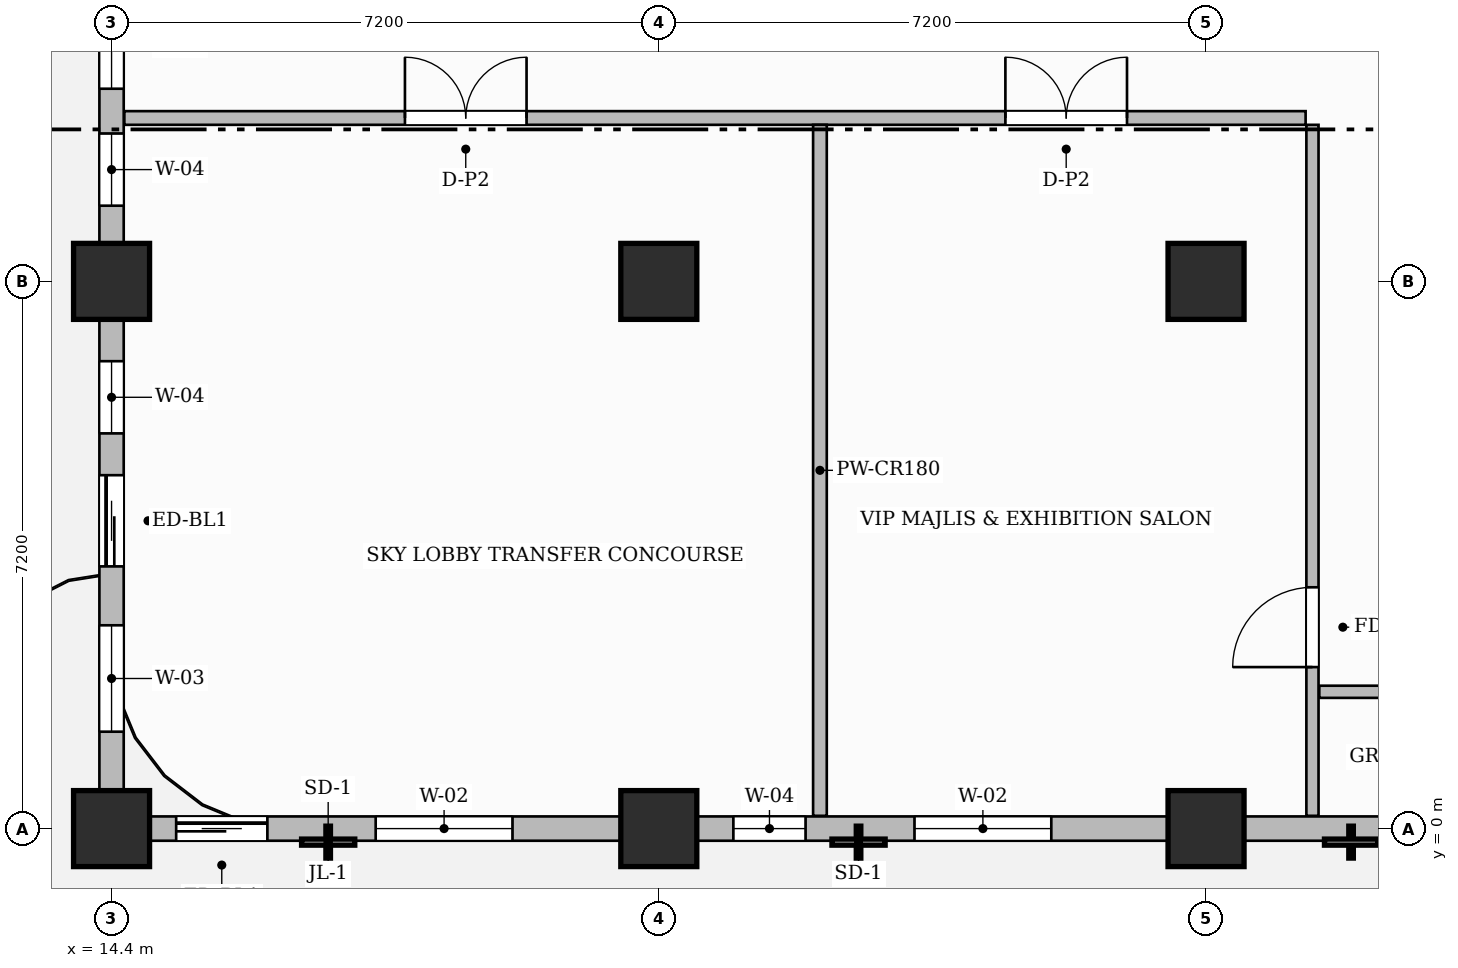
"""IFC4 building model, lengths in metres.
Left out: names, types, materials, properties, quantities, classifications, styles, units other than length and angle.
Written with IfcOpenShell. Run it as: python <this file> out.ifc"""

import sys

from ifc_helpers import new_model, si_unit, direction, frame, frame_2d, origin, origin_2d, place, context, subcontext, project, spatial, rectangle, extrude, source, transform, mapped, element, fill, save


model = new_model("IFC4")
c1 = context("Model", 3, precision=1e-05, world=origin(), true_north=direction((0.0, 1.0)))
c2 = subcontext(c1, "Body", "Model", "MODEL_VIEW")
j1 = project(units=[si_unit("LENGTHUNIT", "METRE"), si_unit("PLANEANGLEUNIT", "RADIAN")], contexts=[c1])
p1 = place(None, origin())
s1 = spatial("IfcSite", under=j1, at=p1, CompositionType="ELEMENT")
p2 = place(p1, origin())
s2 = spatial("IfcBuilding", under=s1, at=p2, CompositionType="ELEMENT")
p3 = place(p2, frame((0.0, 0.0, 145.1)))
s3 = spatial("IfcBuildingStorey", under=s2, at=p3, CompositionType="ELEMENT", Elevation=145.1)
m1 = source(origin(), c2, "Body", "SweptSolid", [
    extrude(rectangle(XDim=1.0, YDim=1.0, at=origin_2d()), origin(), (0.0, 0.0, 1.0), 5.2),
])
for number, where, z_axis, x_axis in (
    (1, (14.4, 0.0, 0.0), (0.0, 0.0, 1.0), (1.0, 0.0, 0.0)),
    (2, (14.4, 7.2, 0.0), (0.0, 0.0, 1.0), (1.0, 0.0, 0.0)),
    (3, (21.6, 0.0, 0.0), (0.0, 0.0, 1.0), (1.0, 0.0, 0.0)),
    (4, (21.6, 7.2, 0.0), (0.0, 0.0, 1.0), (1.0, 0.0, 0.0)),
    (5, (28.8, 0.0, 0.0), (0.0, 0.0, 1.0), (1.0, 0.0, 0.0)),
    (6, (28.8, 7.2, 0.0), (0.0, 0.0, 1.0), (1.0, 0.0, 0.0)),
):
    element("IfcColumn", number, at=place(p3, frame(where, z_axis=z_axis, x_axis=x_axis)), inside=s3, PredefinedType="COLUMN", context=c2, shape_type="MappedRepresentation", body=[
        mapped(m1, transform((0.0, 0.0, 0.0), scale=1.0)),
    ])
p4 = place(p3, frame((14.568, 9.35, 0.0), z_axis=(0.0, 0.0, 1.0), x_axis=(1.0, 0.0, 0.0)))
e7 = element("IfcWall", 7, at=p4, inside=s3, PredefinedType="PARTITIONING", context=c2, shape_type="SweptSolid", body=[
    extrude(rectangle(XDim=15.542, YDim=0.18, at=frame_2d((7.771, 0.0))), origin(), (0.0, 0.0, 1.0), 4.95),
])
p5 = place(p4, frame((3.692, 0.0, 0.0)))
e8 = element("IfcOpeningElement", 8, at=p5, cuts=e7, PredefinedType="OPENING", context=c2, shape_type="SweptSolid", body=[
    extrude(rectangle(XDim=1.6, YDim=2.4, at=frame_2d((0.8, 1.2))), frame((0.0, 0.1, 0.0), z_axis=(0.0, -1.0, 0.0), x_axis=(1.0, 0.0, 0.0)), (0.0, 0.0, 1.0), 0.2),
])
p6 = place(p4, frame((11.592, 0.0, 0.0)))
e9 = element("IfcOpeningElement", 9, at=p6, cuts=e7, PredefinedType="OPENING", context=c2, shape_type="SweptSolid", body=[
    extrude(rectangle(XDim=1.6, YDim=2.4, at=frame_2d((0.8, 1.2))), frame((0.0, 0.1, 0.0), z_axis=(0.0, -1.0, 0.0), x_axis=(1.0, 0.0, 0.0)), (0.0, 0.0, 1.0), 0.2),
])
p7 = place(p3, frame((30.2, 0.168, 0.0), z_axis=(0.0, 0.0, 1.0), x_axis=(0.0, 1.0, 0.0)))
e10 = element("IfcWall", 10, at=p7, inside=s3, PredefinedType="PARTITIONING", context=c2, shape_type="SweptSolid", body=[
    extrude(rectangle(XDim=9.092, YDim=0.16, at=frame_2d((4.546, 0.0))), origin(), (0.0, 0.0, 1.0), 4.95),
])
p8 = place(p7, frame((1.957, 0.0, 0.0)))
e11 = element("IfcOpeningElement", 11, at=p8, cuts=e10, PredefinedType="OPENING", context=c2, shape_type="SweptSolid", body=[
    extrude(rectangle(XDim=1.05, YDim=2.15, at=frame_2d((0.525, 1.075))), frame((0.0, 0.09, 0.0), z_axis=(0.0, -1.0, 0.0), x_axis=(1.0, 0.0, 0.0)), (0.0, 0.0, 1.0), 0.18),
])
p9 = place(p3, frame((30.29, 1.8, 0.0), z_axis=(0.0, 0.0, 1.0), x_axis=(1.0, 0.0, 0.0)))
e12 = element("IfcWall", 12, at=p9, inside=s3, PredefinedType="PARTITIONING", context=c2, shape_type="SweptSolid", body=[
    extrude(rectangle(XDim=19.37, YDim=0.16, at=frame_2d((9.685, 0.0))), origin(), (0.0, 0.0, 1.0), 4.95),
])
p10 = place(p9, frame((9.735, 0.0, 0.0)))
e13 = element("IfcOpeningElement", 13, at=p10, cuts=e12, PredefinedType="OPENING", context=c2, shape_type="SweptSolid", body=[
    extrude(rectangle(XDim=0.95, YDim=2.15, at=frame_2d((0.475, 1.075))), frame((0.0, 0.09, 0.0), z_axis=(0.0, -1.0, 0.0), x_axis=(1.0, 0.0, 0.0)), (0.0, 0.0, 1.0), 0.18),
])
p11 = place(p3, frame((23.72, 0.168, 0.0), z_axis=(0.0, 0.0, 1.0), x_axis=(0.0, 1.0, 0.0)))
e14 = element("IfcWall", 14, at=p11, inside=s3, PredefinedType="PARTITIONING", context=c2, shape_type="SweptSolid", body=[
    extrude(rectangle(XDim=9.092, YDim=0.18, at=frame_2d((4.546, 0.0))), origin(), (0.0, 0.0, 1.0), 4.95),
])
p12 = place(p3, frame((14.4, 0.0, 0.0), z_axis=(0.0, 0.0, 1.0), x_axis=(1.0, 0.0, 0.0)))
e15 = element("IfcWall", 15, at=p12, inside=s3, PredefinedType="SOLIDWALL", context=c2, shape_type="SweptSolid", body=[
    extrude(rectangle(XDim=35.4, YDim=0.32, at=frame_2d((17.7, 0.0))), origin(), (0.0, 0.0, 1.0), 4.335),
])
p13 = place(p12, frame((0.85, 0.0, 0.0)))
e16 = element("IfcOpeningElement", 16, at=p13, cuts=e15, PredefinedType="OPENING", context=c2, shape_type="SweptSolid", body=[
    extrude(rectangle(XDim=1.2, YDim=2.2, at=frame_2d((0.6, 1.1))), frame((0.0, 0.17, 0.0), z_axis=(0.0, -1.0, 0.0), x_axis=(1.0, 0.0, 0.0)), (0.0, 0.0, 1.0), 0.34),
])
p14 = place(p12, frame((3.475, 0.0, 0.8)))
e17 = element("IfcOpeningElement", 17, at=p14, cuts=e15, PredefinedType="OPENING", context=c2, shape_type="SweptSolid", body=[
    extrude(rectangle(XDim=1.8, YDim=1.85, at=frame_2d((0.9, 0.925))), frame((0.0, 0.17, 0.0), z_axis=(0.0, -1.0, 0.0), x_axis=(1.0, 0.0, 0.0)), (0.0, 0.0, 1.0), 0.34),
])
p15 = place(p12, frame((8.181, 0.0, 0.8)))
e18 = element("IfcOpeningElement", 18, at=p15, cuts=e15, PredefinedType="OPENING", context=c2, shape_type="SweptSolid", body=[
    extrude(rectangle(XDim=0.95, YDim=1.75, at=frame_2d((0.475, 0.875))), frame((0.0, 0.17, 0.0), z_axis=(0.0, -1.0, 0.0), x_axis=(1.0, 0.0, 0.0)), (0.0, 0.0, 1.0), 0.34),
])
p16 = place(p12, frame((10.564, 0.0, 0.8)))
e19 = element("IfcOpeningElement", 19, at=p16, cuts=e15, PredefinedType="OPENING", context=c2, shape_type="SweptSolid", body=[
    extrude(rectangle(XDim=1.8, YDim=1.85, at=frame_2d((0.9, 0.925))), frame((0.0, 0.17, 0.0), z_axis=(0.0, -1.0, 0.0), x_axis=(1.0, 0.0, 0.0)), (0.0, 0.0, 1.0), 0.34),
])
p17 = place(p12, frame((16.804, 0.0, 0.8)))
e20 = element("IfcOpeningElement", 20, at=p17, cuts=e15, PredefinedType="OPENING", context=c2, shape_type="SweptSolid", body=[
    extrude(rectangle(XDim=1.8, YDim=1.85, at=frame_2d((0.9, 0.925))), frame((0.0, 0.17, 0.0), z_axis=(0.0, -1.0, 0.0), x_axis=(1.0, 0.0, 0.0)), (0.0, 0.0, 1.0), 0.34),
])
p18 = place(p12, frame((21.725, 0.0, 0.8)))
e21 = element("IfcOpeningElement", 21, at=p18, cuts=e15, PredefinedType="OPENING", context=c2, shape_type="SweptSolid", body=[
    extrude(rectangle(XDim=1.8, YDim=1.85, at=frame_2d((0.9, 0.925))), frame((0.0, 0.17, 0.0), z_axis=(0.0, -1.0, 0.0), x_axis=(1.0, 0.0, 0.0)), (0.0, 0.0, 1.0), 0.34),
])
p19 = place(p12, frame((24.475, 0.0, 0.8)))
e22 = element("IfcOpeningElement", 22, at=p19, cuts=e15, PredefinedType="OPENING", context=c2, shape_type="SweptSolid", body=[
    extrude(rectangle(XDim=1.8, YDim=1.85, at=frame_2d((0.9, 0.925))), frame((0.0, 0.17, 0.0), z_axis=(0.0, -1.0, 0.0), x_axis=(1.0, 0.0, 0.0)), (0.0, 0.0, 1.0), 0.34),
])
p20 = place(p12, frame((29.075, 0.0, 0.8)))
e23 = element("IfcOpeningElement", 23, at=p20, cuts=e15, PredefinedType="OPENING", context=c2, shape_type="SweptSolid", body=[
    extrude(rectangle(XDim=1.8, YDim=1.85, at=frame_2d((0.9, 0.925))), frame((0.0, 0.17, 0.0), z_axis=(0.0, -1.0, 0.0), x_axis=(1.0, 0.0, 0.0)), (0.0, 0.0, 1.0), 0.34),
])
p21 = place(p12, frame((32.125, 0.0, 0.8)))
e24 = element("IfcOpeningElement", 24, at=p21, cuts=e15, PredefinedType="OPENING", context=c2, shape_type="SweptSolid", body=[
    extrude(rectangle(XDim=1.8, YDim=1.85, at=frame_2d((0.9, 0.925))), frame((0.0, 0.17, 0.0), z_axis=(0.0, -1.0, 0.0), x_axis=(1.0, 0.0, 0.0)), (0.0, 0.0, 1.0), 0.34),
])
p22 = place(p3, frame((14.4, 0.05, 0.0), z_axis=(0.0, 0.0, 1.0), x_axis=(0.0, 1.0, 0.0)))
e25 = element("IfcWall", 25, at=p22, inside=s3, PredefinedType="SOLIDWALL", context=c2, shape_type="SweptSolid", body=[
    extrude(rectangle(XDim=20.6, YDim=0.32, at=frame_2d((10.3, 0.0))), origin(), (0.0, 0.0, 1.0), 4.335),
])
p23 = place(p22, frame((3.4, 0.0, 0.0)))
e26 = element("IfcOpeningElement", 26, at=p23, cuts=e25, PredefinedType="OPENING", context=c2, shape_type="SweptSolid", body=[
    extrude(rectangle(XDim=1.2, YDim=2.2, at=frame_2d((0.6, 1.1))), frame((0.0, 0.17, 0.0), z_axis=(0.0, -1.0, 0.0), x_axis=(1.0, 0.0, 0.0)), (0.0, 0.0, 1.0), 0.34),
])
p24 = place(p22, frame((1.225, 0.0, 0.8)))
e27 = element("IfcOpeningElement", 27, at=p24, cuts=e25, PredefinedType="OPENING", context=c2, shape_type="SweptSolid", body=[
    extrude(rectangle(XDim=1.4, YDim=1.85, at=frame_2d((0.7, 0.925))), frame((0.0, 0.17, 0.0), z_axis=(0.0, -1.0, 0.0), x_axis=(1.0, 0.0, 0.0)), (0.0, 0.0, 1.0), 0.34),
])
p25 = place(p22, frame((5.15, 0.0, 0.8)))
e28 = element("IfcOpeningElement", 28, at=p25, cuts=e25, PredefinedType="OPENING", context=c2, shape_type="SweptSolid", body=[
    extrude(rectangle(XDim=0.95, YDim=1.75, at=frame_2d((0.475, 0.875))), frame((0.0, 0.17, 0.0), z_axis=(0.0, -1.0, 0.0), x_axis=(1.0, 0.0, 0.0)), (0.0, 0.0, 1.0), 0.34),
])
p26 = place(p22, frame((8.146, 0.0, 0.8)))
e29 = element("IfcOpeningElement", 29, at=p26, cuts=e25, PredefinedType="OPENING", context=c2, shape_type="SweptSolid", body=[
    extrude(rectangle(XDim=0.95, YDim=1.75, at=frame_2d((0.475, 0.875))), frame((0.0, 0.17, 0.0), z_axis=(0.0, -1.0, 0.0), x_axis=(1.0, 0.0, 0.0)), (0.0, 0.0, 1.0), 0.34),
])
p27 = place(p22, frame((9.685, 0.0, 0.8)))
e30 = element("IfcOpeningElement", 30, at=p27, cuts=e25, PredefinedType="OPENING", context=c2, shape_type="SweptSolid", body=[
    extrude(rectangle(XDim=1.15, YDim=1.8, at=frame_2d((0.575, 0.9))), frame((0.0, 0.17, 0.0), z_axis=(0.0, -1.0, 0.0), x_axis=(1.0, 0.0, 0.0)), (0.0, 0.0, 1.0), 0.34),
])
p28 = place(p22, frame((11.689, 0.0, 0.8)))
e31 = element("IfcOpeningElement", 31, at=p28, cuts=e25, PredefinedType="OPENING", context=c2, shape_type="SweptSolid", body=[
    extrude(rectangle(XDim=1.4, YDim=1.85, at=frame_2d((0.7, 0.925))), frame((0.0, 0.17, 0.0), z_axis=(0.0, -1.0, 0.0), x_axis=(1.0, 0.0, 0.0)), (0.0, 0.0, 1.0), 0.34),
])
p29 = place(p22, frame((16.79, 0.0, 0.8)))
e32 = element("IfcOpeningElement", 32, at=p29, cuts=e25, PredefinedType="OPENING", context=c2, shape_type="SweptSolid", body=[
    extrude(rectangle(XDim=1.8, YDim=1.85, at=frame_2d((0.9, 0.925))), frame((0.0, 0.17, 0.0), z_axis=(0.0, -1.0, 0.0), x_axis=(1.0, 0.0, 0.0)), (0.0, 0.0, 1.0), 0.34),
])
m2 = source(origin(), c2, "Body", "SweptSolid", [
    extrude(rectangle(XDim=1.05, YDim=2.15, at=frame_2d((0.525, 1.075))), frame((0.0, 0.025, 0.0), z_axis=(0.0, -1.0, 0.0), x_axis=(1.0, 0.0, 0.0)), (0.0, 0.0, 1.0), 0.05),
])
p30 = place(p8, origin())
e33 = element("IfcDoor", 33, at=p30, inside=s3, OperationType="SINGLE_SWING_LEFT", PredefinedType="DOOR", context=c2, shape_type="MappedRepresentation", body=[
    mapped(m2, transform((0.0, 0.0, 0.0), scale=1.0)),
])
fill(e11, e33)
m3 = source(origin(), c2, "Body", "SweptSolid", [
    extrude(rectangle(XDim=1.6, YDim=2.4, at=frame_2d((0.8, 1.2))), frame((0.0, 0.025, 0.0), z_axis=(0.0, -1.0, 0.0), x_axis=(1.0, 0.0, 0.0)), (0.0, 0.0, 1.0), 0.05),
])
p31 = place(p5, origin())
e34 = element("IfcDoor", 34, at=p31, inside=s3, OperationType="DOUBLE_DOOR_SINGLE_SWING", PredefinedType="DOOR", context=c2, shape_type="MappedRepresentation", body=[
    mapped(m3, transform((0.0, 0.0, 0.0), scale=1.0)),
])
fill(e8, e34)
p32 = place(p6, origin())
e35 = element("IfcDoor", 35, at=p32, inside=s3, OperationType="DOUBLE_DOOR_SINGLE_SWING", PredefinedType="DOOR", context=c2, shape_type="MappedRepresentation", body=[
    mapped(m3, transform((0.0, 0.0, 0.0), scale=1.0)),
])
fill(e9, e35)
m4 = source(origin(), c2, "Body", "SweptSolid", [
    extrude(rectangle(XDim=1.2, YDim=2.2, at=frame_2d((0.6, 1.1))), frame((0.0, 0.025, 0.0), z_axis=(0.0, -1.0, 0.0), x_axis=(1.0, 0.0, 0.0)), (0.0, 0.0, 1.0), 0.05),
])
p33 = place(p13, origin())
e36 = element("IfcDoor", 36, at=p33, inside=s3, OperationType="SLIDING_TO_LEFT", PredefinedType="DOOR", context=c2, shape_type="MappedRepresentation", body=[
    mapped(m4, transform((0.0, 0.0, 0.0), scale=1.0)),
])
fill(e16, e36)
p34 = place(p23, origin())
e37 = element("IfcDoor", 37, at=p34, inside=s3, OperationType="SLIDING_TO_LEFT", PredefinedType="DOOR", context=c2, shape_type="MappedRepresentation", body=[
    mapped(m4, transform((0.0, 0.0, 0.0), scale=1.0)),
])
fill(e26, e37)
m5 = source(origin(), c2, "Body", "SweptSolid", [
    extrude(rectangle(XDim=1.8, YDim=1.85, at=frame_2d((0.9, 0.925))), frame((0.0, 0.03, 0.0), z_axis=(0.0, -1.0, 0.0), x_axis=(1.0, 0.0, 0.0)), (0.0, 0.0, 1.0), 0.06),
])
p35 = place(p14, origin())
e38 = element("IfcWindow", 38, at=p35, inside=s3, PartitioningType="DOUBLE_PANEL_VERTICAL", PredefinedType="WINDOW", context=c2, shape_type="MappedRepresentation", body=[
    mapped(m5, transform((0.0, 0.0, 0.0), scale=1.0)),
])
fill(e17, e38)
m6 = source(origin(), c2, "Body", "SweptSolid", [
    extrude(rectangle(XDim=0.95, YDim=1.75, at=frame_2d((0.475, 0.875))), frame((0.0, 0.03, 0.0), z_axis=(0.0, -1.0, 0.0), x_axis=(1.0, 0.0, 0.0)), (0.0, 0.0, 1.0), 0.06),
])
p36 = place(p15, origin())
e39 = element("IfcWindow", 39, at=p36, inside=s3, PartitioningType="SINGLE_PANEL", PredefinedType="WINDOW", context=c2, shape_type="MappedRepresentation", body=[
    mapped(m6, transform((0.0, 0.0, 0.0), scale=1.0)),
])
fill(e18, e39)
p37 = place(p16, origin())
e40 = element("IfcWindow", 40, at=p37, inside=s3, PartitioningType="DOUBLE_PANEL_VERTICAL", PredefinedType="WINDOW", context=c2, shape_type="MappedRepresentation", body=[
    mapped(m5, transform((0.0, 0.0, 0.0), scale=1.0)),
])
fill(e19, e40)
m7 = source(origin(), c2, "Body", "SweptSolid", [
    extrude(rectangle(XDim=1.4, YDim=1.85, at=frame_2d((0.7, 0.925))), frame((0.0, 0.03, 0.0), z_axis=(0.0, -1.0, 0.0), x_axis=(1.0, 0.0, 0.0)), (0.0, 0.0, 1.0), 0.06),
])
p38 = place(p24, origin())
e41 = element("IfcWindow", 41, at=p38, inside=s3, PartitioningType="SINGLE_PANEL", PredefinedType="WINDOW", context=c2, shape_type="MappedRepresentation", body=[
    mapped(m7, transform((0.0, 0.0, 0.0), scale=1.0)),
])
fill(e27, e41)
p39 = place(p25, origin())
e42 = element("IfcWindow", 42, at=p39, inside=s3, PartitioningType="SINGLE_PANEL", PredefinedType="WINDOW", context=c2, shape_type="MappedRepresentation", body=[
    mapped(m6, transform((0.0, 0.0, 0.0), scale=1.0)),
])
fill(e28, e42)
p40 = place(p26, origin())
e43 = element("IfcWindow", 43, at=p40, inside=s3, PartitioningType="SINGLE_PANEL", PredefinedType="WINDOW", context=c2, shape_type="MappedRepresentation", body=[
    mapped(m6, transform((0.0, 0.0, 0.0), scale=1.0)),
])
fill(e29, e43)
m8 = source(origin(), c2, "Body", "SweptSolid", [
    extrude(rectangle(XDim=1.15, YDim=1.8, at=frame_2d((0.575, 0.9))), frame((0.0, 0.03, 0.0), z_axis=(0.0, -1.0, 0.0), x_axis=(1.0, 0.0, 0.0)), (0.0, 0.0, 1.0), 0.06),
])
p41 = place(p27, origin())
e44 = element("IfcWindow", 44, at=p41, inside=s3, PartitioningType="SINGLE_PANEL", PredefinedType="WINDOW", context=c2, shape_type="MappedRepresentation", body=[
    mapped(m8, transform((0.0, 0.0, 0.0), scale=1.0)),
])
fill(e30, e44)
save(model, sys.argv[1])
